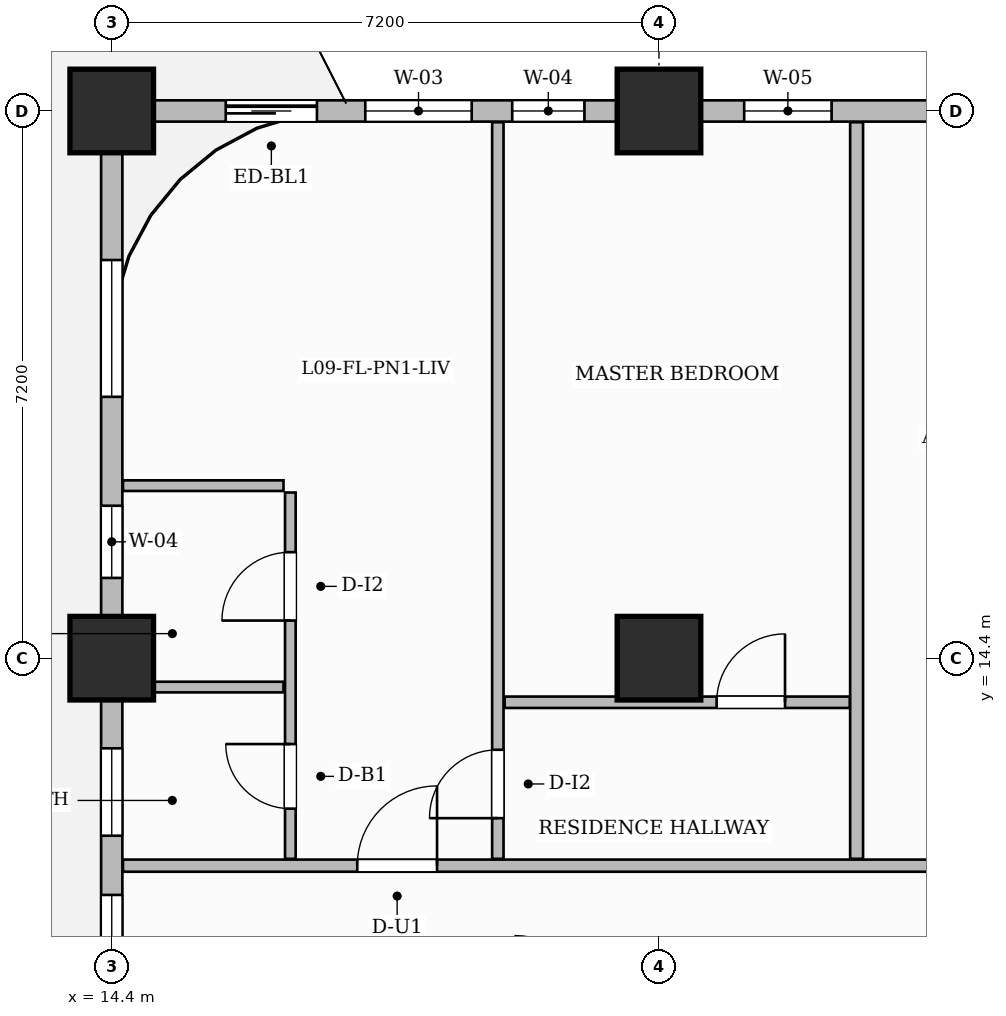
"""IFC4 building model, lengths in metres.
Left out: names, types, materials, properties, quantities, classifications, styles, units other than length and angle.
Written with IfcOpenShell. Run it as: python <this file> out.ifc"""

import sys

from ifc_helpers import new_model, si_unit, direction, frame, frame_2d, origin, origin_2d, place, context, subcontext, project, spatial, rectangle, extrude, source, transform, mapped, element, fill, save


model = new_model("IFC4")
c1 = context("Model", 3, precision=1e-05, world=origin(), true_north=direction((0.0, 1.0)))
c2 = subcontext(c1, "Body", "Model", "MODEL_VIEW")
j1 = project(units=[si_unit("LENGTHUNIT", "METRE"), si_unit("PLANEANGLEUNIT", "RADIAN")], contexts=[c1])
p1 = place(None, origin())
s1 = spatial("IfcSite", under=j1, at=p1, CompositionType="ELEMENT")
p2 = place(p1, origin())
s2 = spatial("IfcBuilding", under=s1, at=p2, CompositionType="ELEMENT")
p3 = place(p2, frame((0.0, 0.0, 43.5)))
s3 = spatial("IfcBuildingStorey", under=s2, at=p3, CompositionType="ELEMENT", Elevation=43.5)
m1 = source(origin(), c2, "Body", "SweptSolid", [
    extrude(rectangle(XDim=1.1, YDim=1.1, at=origin_2d()), origin(), (0.0, 0.0, 1.0), 3.7),
])
for number, where, z_axis, x_axis in (
    (1, (14.4, 14.4, 0.0), (0.0, 0.0, 1.0), (1.0, 0.0, 0.0)),
    (2, (14.4, 21.6, 0.0), (0.0, 0.0, 1.0), (1.0, 0.0, 0.0)),
    (3, (21.6, 14.4, 0.0), (0.0, 0.0, 1.0), (1.0, 0.0, 0.0)),
    (4, (21.6, 21.6, 0.0), (0.0, 0.0, 1.0), (1.0, 0.0, 0.0)),
):
    element("IfcColumn", number, at=place(p3, frame(where, z_axis=z_axis, x_axis=x_axis)), inside=s3, PredefinedType="COLUMN", context=c2, shape_type="MappedRepresentation", body=[
        mapped(m1, transform((0.0, 0.0, 0.0), scale=1.0)),
    ])
p4 = place(p3, frame((14.548, 11.67, 0.0), z_axis=(0.0, 0.0, 1.0), x_axis=(1.0, 0.0, 0.0)))
e5 = element("IfcWall", 5, at=p4, inside=s3, PredefinedType="PARTITIONING", context=c2, shape_type="SweptSolid", body=[
    extrude(rectangle(XDim=15.562, YDim=0.16, at=frame_2d((7.781, 0.0))), origin(), (0.0, 0.0, 1.0), 3.45),
])
p5 = place(p4, frame((3.082, 0.0, 0.0)))
e6 = element("IfcOpeningElement", 6, at=p5, cuts=e5, PredefinedType="OPENING", context=c2, shape_type="SweptSolid", body=[
    extrude(rectangle(XDim=1.05, YDim=2.25, at=frame_2d((0.525, 1.125))), frame((0.0, 0.09, 0.0), z_axis=(0.0, -1.0, 0.0), x_axis=(1.0, 0.0, 0.0)), (0.0, 0.0, 1.0), 0.18),
])
p6 = place(p4, frame((11.952, 0.0, 0.0)))
e7 = element("IfcOpeningElement", 7, at=p6, cuts=e5, PredefinedType="OPENING", context=c2, shape_type="SweptSolid", body=[
    extrude(rectangle(XDim=1.4, YDim=2.35, at=frame_2d((0.7, 1.175))), frame((0.0, 0.09, 0.0), z_axis=(0.0, -1.0, 0.0), x_axis=(1.0, 0.0, 0.0)), (0.0, 0.0, 1.0), 0.18),
])
p7 = place(p3, frame((24.2, 11.76, 0.0), z_axis=(0.0, 0.0, 1.0), x_axis=(0.0, 1.0, 0.0)))
e8 = element("IfcWall", 8, at=p7, inside=s3, PredefinedType="PARTITIONING", context=c2, shape_type="SweptSolid", body=[
    extrude(rectangle(XDim=9.692, YDim=0.17, at=frame_2d((4.846, 0.0))), origin(), (0.0, 0.0, 1.0), 3.45),
])
p8 = place(p3, frame((16.75, 11.76, 0.0), z_axis=(0.0, 0.0, 1.0), x_axis=(0.0, 1.0, 0.0)))
e9 = element("IfcWall", 9, at=p8, inside=s3, PredefinedType="PARTITIONING", context=c2, shape_type="SweptSolid", body=[
    extrude(rectangle(XDim=4.82, YDim=0.14, at=frame_2d((2.41, 0.0))), origin(), (0.0, 0.0, 1.0), 3.45),
])
p9 = place(p8, frame((0.66, 0.0, 0.0)))
e10 = element("IfcOpeningElement", 10, at=p9, cuts=e9, PredefinedType="OPENING", context=c2, shape_type="SweptSolid", body=[
    extrude(rectangle(XDim=0.85, YDim=2.1, at=frame_2d((0.425, 1.05))), frame((0.0, 0.08, 0.0), z_axis=(0.0, -1.0, 0.0), x_axis=(1.0, 0.0, 0.0)), (0.0, 0.0, 1.0), 0.16),
])
p10 = place(p8, frame((3.135, 0.0, 0.0)))
e11 = element("IfcOpeningElement", 11, at=p10, cuts=e9, PredefinedType="OPENING", context=c2, shape_type="SweptSolid", body=[
    extrude(rectangle(XDim=0.9, YDim=2.15, at=frame_2d((0.45, 1.075))), frame((0.0, 0.08, 0.0), z_axis=(0.0, -1.0, 0.0), x_axis=(1.0, 0.0, 0.0)), (0.0, 0.0, 1.0), 0.16),
])
p11 = place(p3, frame((14.59, 14.02, 0.0), z_axis=(0.0, 0.0, 1.0), x_axis=(1.0, 0.0, 0.0)))
e12 = element("IfcWall", 12, at=p11, inside=s3, PredefinedType="PARTITIONING", context=c2, shape_type="SweptSolid", body=[
    extrude(rectangle(XDim=2.07, YDim=0.14, at=frame_2d((1.035, 0.0))), origin(), (0.0, 0.0, 1.0), 3.45),
])
p12 = place(p3, frame((14.548, 16.67, 0.0), z_axis=(0.0, 0.0, 1.0), x_axis=(1.0, 0.0, 0.0)))
e13 = element("IfcWall", 13, at=p12, inside=s3, PredefinedType="PARTITIONING", context=c2, shape_type="SweptSolid", body=[
    extrude(rectangle(XDim=2.112, YDim=0.14, at=frame_2d((1.056, 0.0))), origin(), (0.0, 0.0, 1.0), 3.45),
])
p13 = place(p3, frame((19.48, 11.76, 0.0), z_axis=(0.0, 0.0, 1.0), x_axis=(0.0, 1.0, 0.0)))
e14 = element("IfcWall", 14, at=p13, inside=s3, PredefinedType="PARTITIONING", context=c2, shape_type="SweptSolid", body=[
    extrude(rectangle(XDim=9.692, YDim=0.15, at=frame_2d((4.846, 0.0))), origin(), (0.0, 0.0, 1.0), 3.45),
])
p14 = place(p13, frame((0.535, 0.0, 0.0)))
e15 = element("IfcOpeningElement", 15, at=p14, cuts=e14, PredefinedType="OPENING", context=c2, shape_type="SweptSolid", body=[
    extrude(rectangle(XDim=0.9, YDim=2.15, at=frame_2d((0.45, 1.075))), frame((0.0, 0.085, 0.0), z_axis=(0.0, -1.0, 0.0), x_axis=(1.0, 0.0, 0.0)), (0.0, 0.0, 1.0), 0.17),
])
p15 = place(p3, frame((19.57, 13.82, 0.0), z_axis=(0.0, 0.0, 1.0), x_axis=(1.0, 0.0, 0.0)))
e16 = element("IfcWall", 16, at=p15, inside=s3, PredefinedType="PARTITIONING", context=c2, shape_type="SweptSolid", body=[
    extrude(rectangle(XDim=4.54, YDim=0.15, at=frame_2d((2.27, 0.0))), origin(), (0.0, 0.0, 1.0), 3.45),
])
p16 = place(p15, frame((2.788, 0.0, 0.0)))
e17 = element("IfcOpeningElement", 17, at=p16, cuts=e16, PredefinedType="OPENING", context=c2, shape_type="SweptSolid", body=[
    extrude(rectangle(XDim=0.9, YDim=2.15, at=frame_2d((0.45, 1.075))), frame((0.0, 0.085, 0.0), z_axis=(0.0, -1.0, 0.0), x_axis=(1.0, 0.0, 0.0)), (0.0, 0.0, 1.0), 0.17),
])
p17 = place(p3, frame((14.4, 21.6, 0.0), z_axis=(0.0, 0.0, 1.0), x_axis=(1.0, 0.0, 0.0)))
e18 = element("IfcWall", 18, at=p17, inside=s3, PredefinedType="SOLIDWALL", context=c2, shape_type="SweptSolid", body=[
    extrude(rectangle(XDim=43.2, YDim=0.28, at=frame_2d((21.6, 0.0))), origin(), (0.0, 0.0, 1.0), 2.885),
])
p18 = place(p17, frame((1.5, 0.0, 0.0)))
e19 = element("IfcOpeningElement", 19, at=p18, cuts=e18, PredefinedType="OPENING", context=c2, shape_type="SweptSolid", body=[
    extrude(rectangle(XDim=1.2, YDim=2.2, at=frame_2d((0.6, 1.1))), frame((0.0, 0.15, 0.0), z_axis=(0.0, -1.0, 0.0), x_axis=(1.0, 0.0, 0.0)), (0.0, 0.0, 1.0), 0.3),
])
p19 = place(p17, frame((3.336, 0.0, 0.8)))
e20 = element("IfcOpeningElement", 20, at=p19, cuts=e18, PredefinedType="OPENING", context=c2, shape_type="SweptSolid", body=[
    extrude(rectangle(XDim=1.4, YDim=1.85, at=frame_2d((0.7, 0.925))), frame((0.0, 0.15, 0.0), z_axis=(0.0, -1.0, 0.0), x_axis=(1.0, 0.0, 0.0)), (0.0, 0.0, 1.0), 0.3),
])
p20 = place(p17, frame((5.269, 0.0, 0.8)))
e21 = element("IfcOpeningElement", 21, at=p20, cuts=e18, PredefinedType="OPENING", context=c2, shape_type="SweptSolid", body=[
    extrude(rectangle(XDim=0.95, YDim=1.75, at=frame_2d((0.475, 0.875))), frame((0.0, 0.15, 0.0), z_axis=(0.0, -1.0, 0.0), x_axis=(1.0, 0.0, 0.0)), (0.0, 0.0, 1.0), 0.3),
])
p21 = place(p17, frame((8.321, 0.0, 0.8)))
e22 = element("IfcOpeningElement", 22, at=p21, cuts=e18, PredefinedType="OPENING", context=c2, shape_type="SweptSolid", body=[
    extrude(rectangle(XDim=1.15, YDim=1.8, at=frame_2d((0.575, 0.9))), frame((0.0, 0.15, 0.0), z_axis=(0.0, -1.0, 0.0), x_axis=(1.0, 0.0, 0.0)), (0.0, 0.0, 1.0), 0.3),
])
p22 = place(p17, frame((10.804, 0.0, 0.8)))
e23 = element("IfcOpeningElement", 23, at=p22, cuts=e18, PredefinedType="OPENING", context=c2, shape_type="SweptSolid", body=[
    extrude(rectangle(XDim=1.8, YDim=1.85, at=frame_2d((0.9, 0.925))), frame((0.0, 0.15, 0.0), z_axis=(0.0, -1.0, 0.0), x_axis=(1.0, 0.0, 0.0)), (0.0, 0.0, 1.0), 0.3),
])
p23 = place(p17, frame((16.601, 0.0, 0.8)))
e24 = element("IfcOpeningElement", 24, at=p23, cuts=e18, PredefinedType="OPENING", context=c2, shape_type="SweptSolid", body=[
    extrude(rectangle(XDim=1.8, YDim=1.85, at=frame_2d((0.9, 0.925))), frame((0.0, 0.15, 0.0), z_axis=(0.0, -1.0, 0.0), x_axis=(1.0, 0.0, 0.0)), (0.0, 0.0, 1.0), 0.3),
])
p24 = place(p17, frame((21.723, 0.0, 0.8)))
e25 = element("IfcOpeningElement", 25, at=p24, cuts=e18, PredefinedType="OPENING", context=c2, shape_type="SweptSolid", body=[
    extrude(rectangle(XDim=1.8, YDim=1.85, at=frame_2d((0.9, 0.925))), frame((0.0, 0.15, 0.0), z_axis=(0.0, -1.0, 0.0), x_axis=(1.0, 0.0, 0.0)), (0.0, 0.0, 1.0), 0.3),
])
p25 = place(p17, frame((24.469, 0.0, 0.8)))
e26 = element("IfcOpeningElement", 26, at=p25, cuts=e18, PredefinedType="OPENING", context=c2, shape_type="SweptSolid", body=[
    extrude(rectangle(XDim=1.8, YDim=1.85, at=frame_2d((0.9, 0.925))), frame((0.0, 0.15, 0.0), z_axis=(0.0, -1.0, 0.0), x_axis=(1.0, 0.0, 0.0)), (0.0, 0.0, 1.0), 0.3),
])
p26 = place(p17, frame((29.075, 0.0, 0.8)))
e27 = element("IfcOpeningElement", 27, at=p26, cuts=e18, PredefinedType="OPENING", context=c2, shape_type="SweptSolid", body=[
    extrude(rectangle(XDim=1.8, YDim=1.85, at=frame_2d((0.9, 0.925))), frame((0.0, 0.15, 0.0), z_axis=(0.0, -1.0, 0.0), x_axis=(1.0, 0.0, 0.0)), (0.0, 0.0, 1.0), 0.3),
])
p27 = place(p17, frame((32.125, 0.0, 0.8)))
e28 = element("IfcOpeningElement", 28, at=p27, cuts=e18, PredefinedType="OPENING", context=c2, shape_type="SweptSolid", body=[
    extrude(rectangle(XDim=1.8, YDim=1.85, at=frame_2d((0.9, 0.925))), frame((0.0, 0.15, 0.0), z_axis=(0.0, -1.0, 0.0), x_axis=(1.0, 0.0, 0.0)), (0.0, 0.0, 1.0), 0.3),
])
p28 = place(p17, frame((36.875, 0.0, 0.8)))
e29 = element("IfcOpeningElement", 29, at=p28, cuts=e18, PredefinedType="OPENING", context=c2, shape_type="SweptSolid", body=[
    extrude(rectangle(XDim=1.8, YDim=1.85, at=frame_2d((0.9, 0.925))), frame((0.0, 0.15, 0.0), z_axis=(0.0, -1.0, 0.0), x_axis=(1.0, 0.0, 0.0)), (0.0, 0.0, 1.0), 0.3),
])
p29 = place(p17, frame((39.925, 0.0, 0.8)))
e30 = element("IfcOpeningElement", 30, at=p29, cuts=e18, PredefinedType="OPENING", context=c2, shape_type="SweptSolid", body=[
    extrude(rectangle(XDim=1.8, YDim=1.85, at=frame_2d((0.9, 0.925))), frame((0.0, 0.15, 0.0), z_axis=(0.0, -1.0, 0.0), x_axis=(1.0, 0.0, 0.0)), (0.0, 0.0, 1.0), 0.3),
])
p30 = place(p3, frame((14.4, 0.05, 0.0), z_axis=(0.0, 0.0, 1.0), x_axis=(0.0, 1.0, 0.0)))
e31 = element("IfcWall", 31, at=p30, inside=s3, PredefinedType="SOLIDWALL", context=c2, shape_type="SweptSolid", body=[
    extrude(rectangle(XDim=21.5, YDim=0.28, at=frame_2d((10.75, 0.0))), origin(), (0.0, 0.0, 1.0), 2.885),
])
p31 = place(p30, frame((1.275, 0.0, 0.8)))
e32 = element("IfcOpeningElement", 32, at=p31, cuts=e31, PredefinedType="OPENING", context=c2, shape_type="SweptSolid", body=[
    extrude(rectangle(XDim=1.8, YDim=1.85, at=frame_2d((0.9, 0.925))), frame((0.0, 0.15, 0.0), z_axis=(0.0, -1.0, 0.0), x_axis=(1.0, 0.0, 0.0)), (0.0, 0.0, 1.0), 0.3),
])
p32 = place(p30, frame((4.025, 0.0, 0.8)))
e33 = element("IfcOpeningElement", 33, at=p32, cuts=e31, PredefinedType="OPENING", context=c2, shape_type="SweptSolid", body=[
    extrude(rectangle(XDim=1.8, YDim=1.85, at=frame_2d((0.9, 0.925))), frame((0.0, 0.15, 0.0), z_axis=(0.0, -1.0, 0.0), x_axis=(1.0, 0.0, 0.0)), (0.0, 0.0, 1.0), 0.3),
])
p33 = place(p30, frame((8.246, 0.0, 0.8)))
e34 = element("IfcOpeningElement", 34, at=p33, cuts=e31, PredefinedType="OPENING", context=c2, shape_type="SweptSolid", body=[
    extrude(rectangle(XDim=1.15, YDim=1.8, at=frame_2d((0.575, 0.9))), frame((0.0, 0.15, 0.0), z_axis=(0.0, -1.0, 0.0), x_axis=(1.0, 0.0, 0.0)), (0.0, 0.0, 1.0), 0.3),
])
p34 = place(p30, frame((10.085, 0.0, 0.8)))
e35 = element("IfcOpeningElement", 35, at=p34, cuts=e31, PredefinedType="OPENING", context=c2, shape_type="SweptSolid", body=[
    extrude(rectangle(XDim=1.15, YDim=1.8, at=frame_2d((0.575, 0.9))), frame((0.0, 0.15, 0.0), z_axis=(0.0, -1.0, 0.0), x_axis=(1.0, 0.0, 0.0)), (0.0, 0.0, 1.0), 0.3),
])
p35 = place(p30, frame((12.014, 0.0, 0.8)))
e36 = element("IfcOpeningElement", 36, at=p35, cuts=e31, PredefinedType="OPENING", context=c2, shape_type="SweptSolid", body=[
    extrude(rectangle(XDim=1.15, YDim=1.8, at=frame_2d((0.575, 0.9))), frame((0.0, 0.15, 0.0), z_axis=(0.0, -1.0, 0.0), x_axis=(1.0, 0.0, 0.0)), (0.0, 0.0, 1.0), 0.3),
])
p36 = place(p30, frame((15.406, 0.0, 0.8)))
e37 = element("IfcOpeningElement", 37, at=p36, cuts=e31, PredefinedType="OPENING", context=c2, shape_type="SweptSolid", body=[
    extrude(rectangle(XDim=0.95, YDim=1.75, at=frame_2d((0.475, 0.875))), frame((0.0, 0.15, 0.0), z_axis=(0.0, -1.0, 0.0), x_axis=(1.0, 0.0, 0.0)), (0.0, 0.0, 1.0), 0.3),
])
p37 = place(p30, frame((17.789, 0.0, 0.8)))
e38 = element("IfcOpeningElement", 38, at=p37, cuts=e31, PredefinedType="OPENING", context=c2, shape_type="SweptSolid", body=[
    extrude(rectangle(XDim=1.8, YDim=1.85, at=frame_2d((0.9, 0.925))), frame((0.0, 0.15, 0.0), z_axis=(0.0, -1.0, 0.0), x_axis=(1.0, 0.0, 0.0)), (0.0, 0.0, 1.0), 0.3),
])
m2 = source(origin(), c2, "Body", "SweptSolid", [
    extrude(rectangle(XDim=0.85, YDim=2.1, at=frame_2d((0.425, 1.05))), frame((0.0, 0.025, 0.0), z_axis=(0.0, -1.0, 0.0), x_axis=(1.0, 0.0, 0.0)), (0.0, 0.0, 1.0), 0.05),
])
p38 = place(p9, origin())
e39 = element("IfcDoor", 39, at=p38, inside=s3, OperationType="SINGLE_SWING_RIGHT", PredefinedType="DOOR", context=c2, shape_type="MappedRepresentation", body=[
    mapped(m2, transform((0.0, 0.0, 0.0), scale=1.0)),
])
fill(e10, e39)
m3 = source(origin(), c2, "Body", "SweptSolid", [
    extrude(rectangle(XDim=0.9, YDim=2.15, at=frame_2d((0.45, 1.075))), frame((0.0, 0.025, 0.0), z_axis=(0.0, -1.0, 0.0), x_axis=(1.0, 0.0, 0.0)), (0.0, 0.0, 1.0), 0.05),
])
p39 = place(p10, origin())
e40 = element("IfcDoor", 40, at=p39, inside=s3, OperationType="SINGLE_SWING_LEFT", PredefinedType="DOOR", context=c2, shape_type="MappedRepresentation", body=[
    mapped(m3, transform((0.0, 0.0, 0.0), scale=1.0)),
])
fill(e11, e40)
m4 = source(origin(), c2, "Body", "SweptSolid", [
    extrude(rectangle(XDim=1.05, YDim=2.25, at=frame_2d((0.525, 1.125))), frame((0.0, 0.025, 0.0), z_axis=(0.0, -1.0, 0.0), x_axis=(1.0, 0.0, 0.0)), (0.0, 0.0, 1.0), 0.05),
])
p40 = place(p5, origin())
e41 = element("IfcDoor", 41, at=p40, inside=s3, OperationType="SINGLE_SWING_RIGHT", PredefinedType="DOOR", context=c2, shape_type="MappedRepresentation", body=[
    mapped(m4, transform((0.0, 0.0, 0.0), scale=1.0)),
])
fill(e6, e41)
p41 = place(p14, origin())
e42 = element("IfcDoor", 42, at=p41, inside=s3, OperationType="SINGLE_SWING_LEFT", PredefinedType="DOOR", context=c2, shape_type="MappedRepresentation", body=[
    mapped(m3, transform((0.0, 0.0, 0.0), scale=1.0)),
])
fill(e15, e42)
p42 = place(p16, origin())
e43 = element("IfcDoor", 43, at=p42, inside=s3, OperationType="SINGLE_SWING_RIGHT", PredefinedType="DOOR", context=c2, shape_type="MappedRepresentation", body=[
    mapped(m3, transform((0.0, 0.0, 0.0), scale=1.0)),
])
fill(e17, e43)
m5 = source(origin(), c2, "Body", "SweptSolid", [
    extrude(rectangle(XDim=1.2, YDim=2.2, at=frame_2d((0.6, 1.1))), frame((0.0, 0.025, 0.0), z_axis=(0.0, -1.0, 0.0), x_axis=(1.0, 0.0, 0.0)), (0.0, 0.0, 1.0), 0.05),
])
p43 = place(p18, origin())
e44 = element("IfcDoor", 44, at=p43, inside=s3, OperationType="SLIDING_TO_LEFT", PredefinedType="DOOR", context=c2, shape_type="MappedRepresentation", body=[
    mapped(m5, transform((0.0, 0.0, 0.0), scale=1.0)),
])
fill(e19, e44)
m6 = source(origin(), c2, "Body", "SweptSolid", [
    extrude(rectangle(XDim=1.4, YDim=1.85, at=frame_2d((0.7, 0.925))), frame((0.0, 0.03, 0.0), z_axis=(0.0, -1.0, 0.0), x_axis=(1.0, 0.0, 0.0)), (0.0, 0.0, 1.0), 0.06),
])
p44 = place(p19, origin())
e45 = element("IfcWindow", 45, at=p44, inside=s3, PartitioningType="SINGLE_PANEL", PredefinedType="WINDOW", context=c2, shape_type="MappedRepresentation", body=[
    mapped(m6, transform((0.0, 0.0, 0.0), scale=1.0)),
])
fill(e20, e45)
m7 = source(origin(), c2, "Body", "SweptSolid", [
    extrude(rectangle(XDim=0.95, YDim=1.75, at=frame_2d((0.475, 0.875))), frame((0.0, 0.03, 0.0), z_axis=(0.0, -1.0, 0.0), x_axis=(1.0, 0.0, 0.0)), (0.0, 0.0, 1.0), 0.06),
])
p45 = place(p20, origin())
e46 = element("IfcWindow", 46, at=p45, inside=s3, PartitioningType="SINGLE_PANEL", PredefinedType="WINDOW", context=c2, shape_type="MappedRepresentation", body=[
    mapped(m7, transform((0.0, 0.0, 0.0), scale=1.0)),
])
fill(e21, e46)
m8 = source(origin(), c2, "Body", "SweptSolid", [
    extrude(rectangle(XDim=1.15, YDim=1.8, at=frame_2d((0.575, 0.9))), frame((0.0, 0.03, 0.0), z_axis=(0.0, -1.0, 0.0), x_axis=(1.0, 0.0, 0.0)), (0.0, 0.0, 1.0), 0.06),
])
p46 = place(p21, origin())
e47 = element("IfcWindow", 47, at=p46, inside=s3, PartitioningType="SINGLE_PANEL", PredefinedType="WINDOW", context=c2, shape_type="MappedRepresentation", body=[
    mapped(m8, transform((0.0, 0.0, 0.0), scale=1.0)),
])
fill(e22, e47)
p47 = place(p34, origin())
e48 = element("IfcWindow", 48, at=p47, inside=s3, PartitioningType="SINGLE_PANEL", PredefinedType="WINDOW", context=c2, shape_type="MappedRepresentation", body=[
    mapped(m8, transform((0.0, 0.0, 0.0), scale=1.0)),
])
fill(e35, e48)
p48 = place(p35, origin())
e49 = element("IfcWindow", 49, at=p48, inside=s3, PartitioningType="SINGLE_PANEL", PredefinedType="WINDOW", context=c2, shape_type="MappedRepresentation", body=[
    mapped(m8, transform((0.0, 0.0, 0.0), scale=1.0)),
])
fill(e36, e49)
p49 = place(p36, origin())
e50 = element("IfcWindow", 50, at=p49, inside=s3, PartitioningType="SINGLE_PANEL", PredefinedType="WINDOW", context=c2, shape_type="MappedRepresentation", body=[
    mapped(m7, transform((0.0, 0.0, 0.0), scale=1.0)),
])
fill(e37, e50)
m9 = source(origin(), c2, "Body", "SweptSolid", [
    extrude(rectangle(XDim=1.8, YDim=1.85, at=frame_2d((0.9, 0.925))), frame((0.0, 0.03, 0.0), z_axis=(0.0, -1.0, 0.0), x_axis=(1.0, 0.0, 0.0)), (0.0, 0.0, 1.0), 0.06),
])
p50 = place(p37, origin())
e51 = element("IfcWindow", 51, at=p50, inside=s3, PartitioningType="DOUBLE_PANEL_VERTICAL", PredefinedType="WINDOW", context=c2, shape_type="MappedRepresentation", body=[
    mapped(m9, transform((0.0, 0.0, 0.0), scale=1.0)),
])
fill(e38, e51)
save(model, sys.argv[1])
